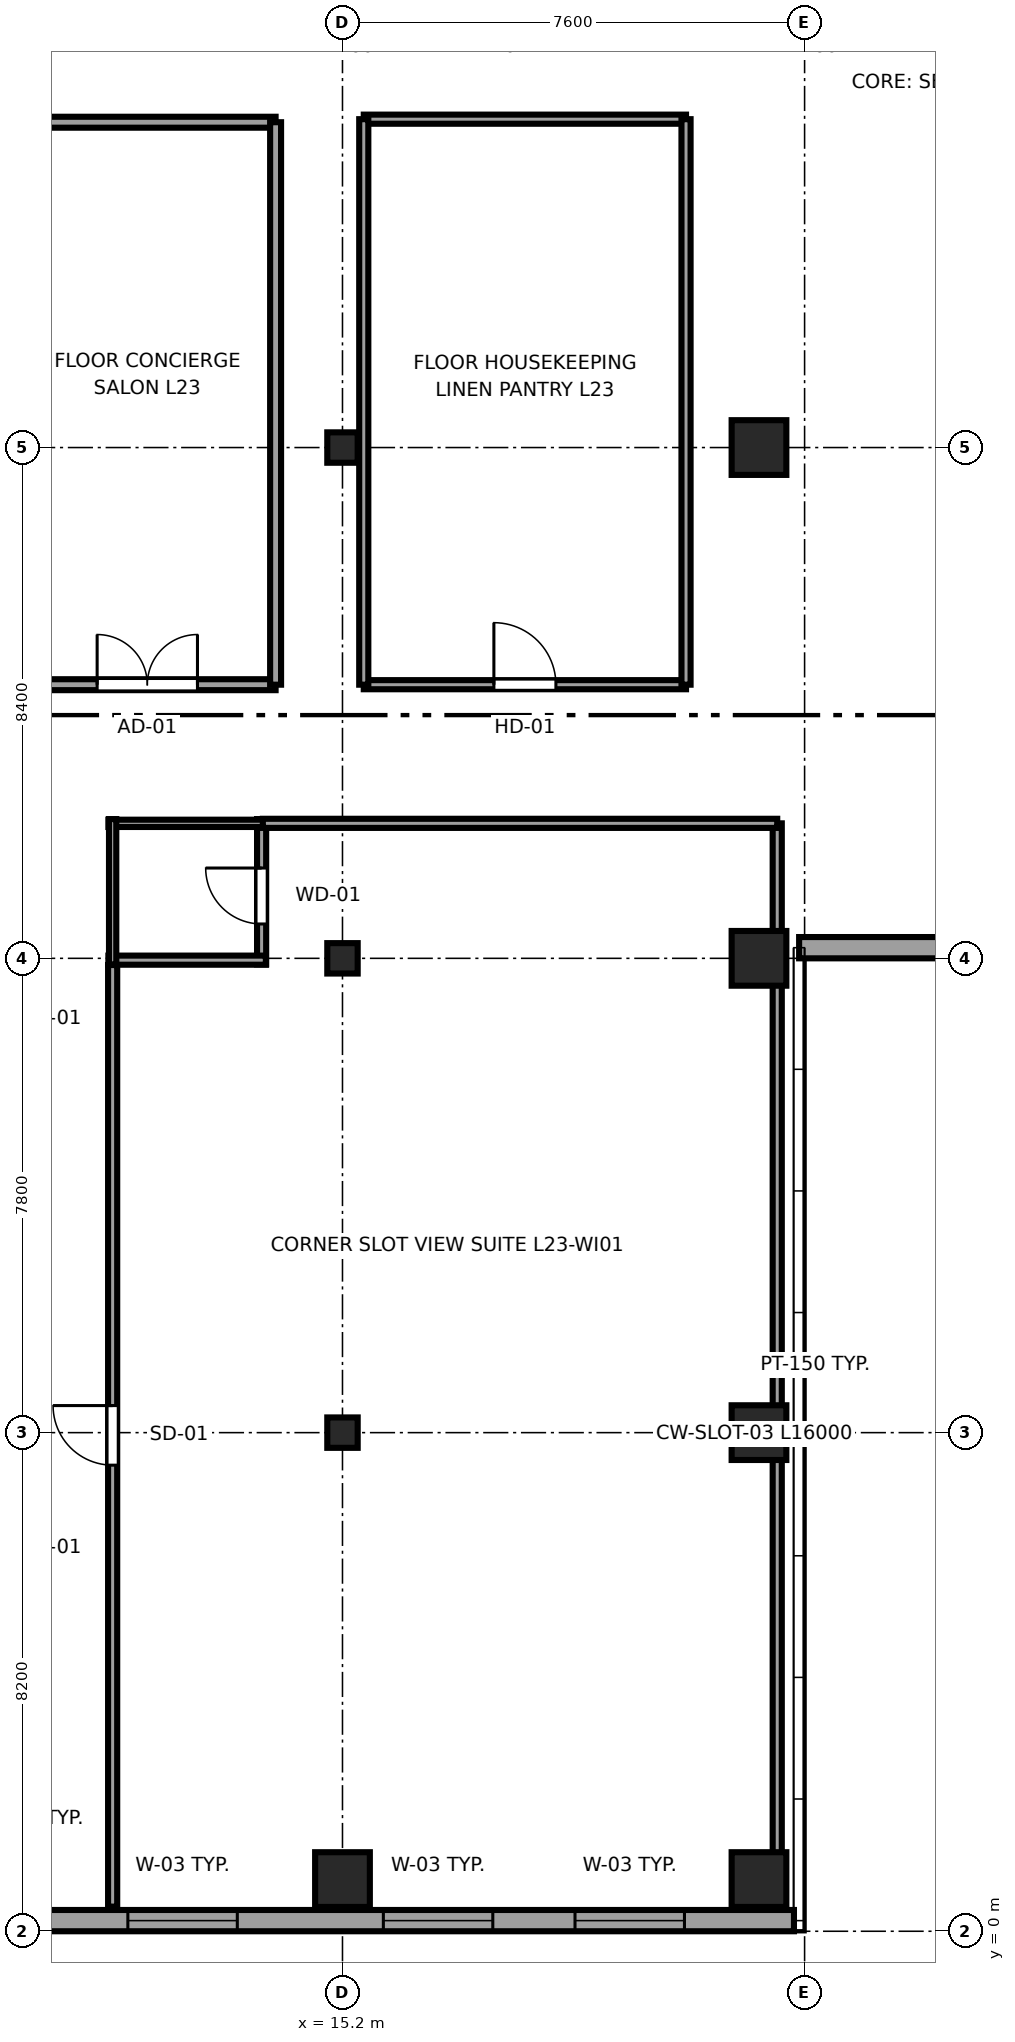
"""IFC4 building model, lengths in metres.
Left out: names, types, materials, properties, quantities, classifications, styles, units other than length and angle.
Written with IfcOpenShell. Run it as: python <this file> out.ifc"""

import sys

from ifc_helpers import new_model, si_unit, direction, frame, frame_2d, origin, origin_2d, place, context, subcontext, project, spatial, rectangle, i_section, extrude, source, transform, mapped, element, fill, save


model = new_model("IFC4")
c1 = context("Model", 3, precision=1e-05, world=origin(), true_north=direction((0.0, 1.0)))
c2 = subcontext(c1, "Body", "Model", "MODEL_VIEW")
j1 = project(units=[si_unit("LENGTHUNIT", "METRE"), si_unit("PLANEANGLEUNIT", "RADIAN")], contexts=[c1])
p1 = place(None, origin())
s1 = spatial("IfcSite", under=j1, at=p1, CompositionType="ELEMENT")
p2 = place(p1, origin())
s2 = spatial("IfcBuilding", under=s1, at=p2, CompositionType="ELEMENT")
p3 = place(p2, frame((0.0, 0.0, 92.35)))
s3 = spatial("IfcBuildingStorey", under=s2, at=p3, CompositionType="ELEMENT", Elevation=92.35)
m1 = source(origin(), c2, "Body", "SweptSolid", [
    extrude(rectangle(XDim=0.9, YDim=0.9, at=origin_2d()), origin(), (0.0, 0.0, 1.0), 3.55),
])
p4 = place(p3, frame((15.2, 0.85, 0.0), z_axis=(0.0, 0.0, 1.0), x_axis=(1.0, 0.0, 0.0)))
e1 = element("IfcColumn", 1, at=p4, inside=s3, PredefinedType="COLUMN", context=c2, shape_type="MappedRepresentation", body=[
    mapped(m1, transform((0.0, 0.0, 0.0), x_axis=(1.0, 0.0, 0.0), y_axis=(0.0, 1.0, 0.0), z_axis=(0.0, 0.0, 1.0), scale=1.0)),
])
m2 = source(origin(), c2, "Body", "SweptSolid", [
    extrude(i_section(OverallWidth=0.5, OverallDepth=0.5, WebThickness=0.022, FlangeThickness=0.034, at=origin_2d()), origin(), (0.0, 0.0, 1.0), 3.55),
])
for number, where, z_axis, x_axis in (
    (2, (15.2, 8.2, 0.0), (0.0, 0.0, 1.0), (1.0, 0.0, 0.0)),
    (3, (15.2, 16.0, 0.0), (0.0, 0.0, 1.0), (1.0, 0.0, 0.0)),
    (4, (15.2, 24.4, 0.0), (0.0, 0.0, 1.0), (1.0, 0.0, 0.0)),
):
    element("IfcColumn", number, at=place(p3, frame(where, z_axis=z_axis, x_axis=x_axis)), inside=s3, PredefinedType="COLUMN", context=c2, shape_type="MappedRepresentation", body=[
        mapped(m2, transform((0.0, 0.0, 0.0), x_axis=(1.0, 0.0, 0.0), y_axis=(0.0, 1.0, 0.0), z_axis=(0.0, 0.0, 1.0), scale=1.0)),
    ])
for number, where, z_axis, x_axis in (
    (5, (22.05, 0.85, 0.0), (0.0, 0.0, 1.0), (1.0, 0.0, 0.0)),
    (6, (22.05, 8.2, 0.0), (0.0, 0.0, 1.0), (1.0, 0.0, 0.0)),
    (7, (22.05, 16.0, 0.0), (0.0, 0.0, 1.0), (1.0, 0.0, 0.0)),
    (8, (22.05, 24.4, 0.0), (0.0, 0.0, 1.0), (1.0, 0.0, 0.0)),
):
    element("IfcColumn", number, at=place(p3, frame(where, z_axis=z_axis, x_axis=x_axis)), inside=s3, PredefinedType="COLUMN", context=c2, shape_type="MappedRepresentation", body=[
        mapped(m1, transform((0.0, 0.0, 0.0), x_axis=(1.0, 0.0, 0.0), y_axis=(0.0, 1.0, 0.0), z_axis=(0.0, 0.0, 1.0), scale=1.0)),
    ])
p5 = place(p3, frame((4.617, 0.175, 0.0), z_axis=(0.0, 0.0, 1.0), x_axis=(1.0, 0.0, 0.0)))
e9 = element("IfcWall", 9, at=p5, inside=s3, PredefinedType="SOLIDWALL", context=c2, shape_type="SweptSolid", body=[
    extrude(rectangle(XDim=18.008, YDim=0.35, at=frame_2d((9.004, 0.0))), origin(), (0.0, 0.0, 1.0), 3.25),
])
p6 = place(p5, frame((7.053, 0.0, 0.68)))
e10 = element("IfcOpeningElement", 10, at=p6, cuts=e9, PredefinedType="OPENING", context=c2, shape_type="SweptSolid", body=[
    extrude(rectangle(XDim=1.8, YDim=1.85, at=frame_2d((0.9, 0.925))), frame((0.0, 0.185, 0.0), z_axis=(0.0, -1.0, 0.0), x_axis=(1.0, 0.0, 0.0)), (0.0, 0.0, 1.0), 0.37),
])
p7 = place(p5, frame((11.255, 0.0, 0.68)))
e11 = element("IfcOpeningElement", 11, at=p7, cuts=e9, PredefinedType="OPENING", context=c2, shape_type="SweptSolid", body=[
    extrude(rectangle(XDim=1.8, YDim=1.85, at=frame_2d((0.9, 0.925))), frame((0.0, 0.185, 0.0), z_axis=(0.0, -1.0, 0.0), x_axis=(1.0, 0.0, 0.0)), (0.0, 0.0, 1.0), 0.37),
])
p8 = place(p5, frame((14.407, 0.0, 0.68)))
e12 = element("IfcOpeningElement", 12, at=p8, cuts=e9, PredefinedType="OPENING", context=c2, shape_type="SweptSolid", body=[
    extrude(rectangle(XDim=1.8, YDim=1.85, at=frame_2d((0.9, 0.925))), frame((0.0, 0.185, 0.0), z_axis=(0.0, -1.0, 0.0), x_axis=(1.0, 0.0, 0.0)), (0.0, 0.0, 1.0), 0.37),
])
p9 = place(p3, frame((22.71, 16.175, 0.0), z_axis=(0.0, 0.0, 1.0), x_axis=(1.0, 0.0, 0.0)))
e13 = element("IfcWall", 13, at=p9, inside=s3, PredefinedType="SOLIDWALL", context=c2, shape_type="SweptSolid", body=[
    extrude(rectangle(XDim=11.58, YDim=0.35, at=frame_2d((5.79, 0.0))), origin(), (0.0, 0.0, 1.0), 2.628),
])
p10 = place(p9, frame((2.295, 0.0, 0.68)))
e14 = element("IfcOpeningElement", 14, at=p10, cuts=e13, PredefinedType="OPENING", context=c2, shape_type="SweptSolid", body=[
    extrude(rectangle(XDim=1.8, YDim=1.85, at=frame_2d((0.9, 0.925))), frame((0.0, 0.185, 0.0), z_axis=(0.0, -1.0, 0.0), x_axis=(1.0, 0.0, 0.0)), (0.0, 0.0, 1.0), 0.37),
])
p11 = place(p9, frame((7.485, 0.0, 0.68)))
e15 = element("IfcOpeningElement", 15, at=p11, cuts=e13, PredefinedType="OPENING", context=c2, shape_type="SweptSolid", body=[
    extrude(rectangle(XDim=1.8, YDim=1.85, at=frame_2d((0.9, 0.925))), frame((0.0, 0.185, 0.0), z_axis=(0.0, -1.0, 0.0), x_axis=(1.0, 0.0, 0.0)), (0.0, 0.0, 1.0), 0.37),
])
p12 = place(p3, frame((13.87, 15.9, 0.0), z_axis=(0.0, 0.0, 1.0), x_axis=(0.0, 1.0, 0.0)))
e16 = element("IfcWall", 16, at=p12, inside=s3, PredefinedType="PARTITIONING", context=c2, shape_type="SweptSolid", body=[
    extrude(rectangle(XDim=2.39, YDim=0.15, at=frame_2d((1.195, 0.0))), origin(), (0.0, 0.0, 1.0), 3.25),
])
p13 = place(p12, frame((0.665, 0.0, 0.0)))
e17 = element("IfcOpeningElement", 17, at=p13, cuts=e16, PredefinedType="OPENING", context=c2, shape_type="SweptSolid", body=[
    extrude(rectangle(XDim=0.92, YDim=2.01, at=frame_2d((0.46, 1.005))), frame((0.0, 0.085, 0.0), z_axis=(0.0, -1.0, 0.0), x_axis=(1.0, 0.0, 0.0)), (0.0, 0.0, 1.0), 0.17),
])
p14 = place(p3, frame((11.35, 15.97, 0.0), z_axis=(0.0, 0.0, 1.0), x_axis=(1.0, 0.0, 0.0)))
e18 = element("IfcWall", 18, at=p14, inside=s3, PredefinedType="PARTITIONING", context=c2, shape_type="SweptSolid", body=[
    extrude(rectangle(XDim=2.59, YDim=0.15, at=frame_2d((1.295, 0.0))), origin(), (0.0, 0.0, 1.0), 2.628),
])
p15 = place(p3, frame((11.35, 18.22, 0.0), z_axis=(0.0, 0.0, 1.0), x_axis=(1.0, 0.0, 0.0)))
e19 = element("IfcWall", 19, at=p15, inside=s3, PredefinedType="PLUMBINGWALL", context=c2, shape_type="SweptSolid", body=[
    extrude(rectangle(XDim=2.59, YDim=0.12, at=frame_2d((1.295, 0.0))), origin(), (0.0, 0.0, 1.0), 3.25),
])
p16 = place(p3, frame((11.42, 15.9, 0.0), z_axis=(0.0, 0.0, 1.0), x_axis=(0.0, 1.0, 0.0)))
e20 = element("IfcWall", 20, at=p16, inside=s3, PredefinedType="PLUMBINGWALL", context=c2, shape_type="SweptSolid", body=[
    extrude(rectangle(XDim=2.39, YDim=0.12, at=frame_2d((1.195, 0.0))), origin(), (0.0, 0.0, 1.0), 2.834),
])
p17 = place(p3, frame((11.42, 0.405, 0.0), z_axis=(0.0, 0.0, 1.0), x_axis=(0.0, 1.0, 0.0)))
e21 = element("IfcWall", 21, at=p17, inside=s3, PredefinedType="PARTITIONING", context=c2, shape_type="SweptSolid", body=[
    extrude(rectangle(XDim=15.485, YDim=0.15, at=frame_2d((7.742, 0.0))), origin(), (0.0, 0.0, 1.0), 2.834),
])
p18 = place(p17, frame((7.26, 0.0, 0.0)))
e22 = element("IfcOpeningElement", 22, at=p18, cuts=e21, PredefinedType="OPENING", context=c2, shape_type="SweptSolid", body=[
    extrude(rectangle(XDim=0.98, YDim=2.12, at=frame_2d((0.49, 1.06))), frame((0.0, 0.085, 0.0), z_axis=(0.0, -1.0, 0.0), x_axis=(1.0, 0.0, 0.0)), (0.0, 0.0, 1.0), 0.17),
])
p19 = place(p3, frame((22.35, 0.405, 0.0), z_axis=(0.0, 0.0, 1.0), x_axis=(0.0, 1.0, 0.0)))
e23 = element("IfcWall", 23, at=p19, inside=s3, PredefinedType="PARTITIONING", context=c2, shape_type="SweptSolid", body=[
    extrude(rectangle(XDim=17.815, YDim=0.15, at=frame_2d((8.907, 0.0))), origin(), (0.0, 0.0, 1.0), 3.25),
])
p20 = place(p3, frame((13.89, 18.22, 0.0), z_axis=(0.0, 0.0, 1.0), x_axis=(1.0, 0.0, 0.0)))
e24 = element("IfcWall", 24, at=p20, inside=s3, PredefinedType="PARTITIONING", context=c2, shape_type="SweptSolid", body=[
    extrude(rectangle(XDim=8.46, YDim=0.15, at=frame_2d((4.23, 0.0))), origin(), (0.0, 0.0, 1.0), 3.25),
])
p21 = place(p3, frame((9.88, 20.5, 0.0), z_axis=(0.0, 0.0, 1.0), x_axis=(1.0, 0.0, 0.0)))
e25 = element("IfcWall", 25, at=p21, inside=s3, PredefinedType="PARTITIONING", context=c2, shape_type="SweptSolid", body=[
    extrude(rectangle(XDim=4.22, YDim=0.18, at=frame_2d((2.11, 0.0))), origin(), (0.0, 0.0, 1.0), 3.25),
])
p22 = place(p21, frame((1.285, 0.0, 0.0)))
e26 = element("IfcOpeningElement", 26, at=p22, cuts=e25, PredefinedType="OPENING", context=c2, shape_type="SweptSolid", body=[
    extrude(rectangle(XDim=1.65, YDim=2.15, at=frame_2d((0.825, 1.075))), frame((0.0, 0.1, 0.0), z_axis=(0.0, -1.0, 0.0), x_axis=(1.0, 0.0, 0.0)), (0.0, 0.0, 1.0), 0.2),
])
p23 = place(p3, frame((9.88, 29.75, 0.0), z_axis=(0.0, 0.0, 1.0), x_axis=(1.0, 0.0, 0.0)))
e27 = element("IfcWall", 27, at=p23, inside=s3, PredefinedType="PARTITIONING", context=c2, shape_type="SweptSolid", body=[
    extrude(rectangle(XDim=4.22, YDim=0.18, at=frame_2d((2.11, 0.0))), origin(), (0.0, 0.0, 1.0), 3.25),
])
p24 = place(p3, frame((14.1, 20.5, 0.0), z_axis=(0.0, 0.0, 1.0), x_axis=(0.0, 1.0, 0.0)))
e28 = element("IfcWall", 28, at=p24, inside=s3, PredefinedType="PARTITIONING", context=c2, shape_type="SweptSolid", body=[
    extrude(rectangle(XDim=9.25, YDim=0.18, at=frame_2d((4.625, 0.0))), origin(), (0.0, 0.0, 1.0), 3.25),
])
p25 = place(p3, frame((15.55, 20.5, 0.0), z_axis=(0.0, 0.0, 1.0), x_axis=(1.0, 0.0, 0.0)))
e29 = element("IfcWall", 29, at=p25, inside=s3, PredefinedType="PARTITIONING", context=c2, shape_type="SweptSolid", body=[
    extrude(rectangle(XDim=5.3, YDim=0.15, at=frame_2d((2.65, 0.0))), origin(), (0.0, 0.0, 1.0), 3.25),
])
p26 = place(p25, frame((2.14, 0.0, 0.0)))
e30 = element("IfcOpeningElement", 30, at=p26, cuts=e29, PredefinedType="OPENING", context=c2, shape_type="SweptSolid", body=[
    extrude(rectangle(XDim=1.02, YDim=2.03, at=frame_2d((0.51, 1.015))), frame((0.0, 0.085, 0.0), z_axis=(0.0, -1.0, 0.0), x_axis=(1.0, 0.0, 0.0)), (0.0, 0.0, 1.0), 0.17),
])
p27 = place(p3, frame((15.55, 29.8, 0.0), z_axis=(0.0, 0.0, 1.0), x_axis=(1.0, 0.0, 0.0)))
e31 = element("IfcWall", 31, at=p27, inside=s3, PredefinedType="PARTITIONING", context=c2, shape_type="SweptSolid", body=[
    extrude(rectangle(XDim=5.3, YDim=0.15, at=frame_2d((2.65, 0.0))), origin(), (0.0, 0.0, 1.0), 3.25),
])
for number, where, z_axis, x_axis in (
    (32, (15.55, 20.5, 0.0), (0.0, 0.0, 1.0), (0.0, 1.0, 0.0)),
    (33, (20.85, 20.5, 0.0), (0.0, 0.0, 1.0), (0.0, 1.0, 0.0)),
):
    element("IfcWall", number, at=place(p3, frame(where, z_axis=z_axis, x_axis=x_axis)), inside=s3, PredefinedType="PARTITIONING", context=c2, shape_type="SweptSolid", body=[
        extrude(rectangle(XDim=9.3, YDim=0.15, at=frame_2d((4.65, 0.0))), origin(), (0.0, 0.0, 1.0), 3.25),
    ])
m3 = source(origin(), c2, "Body", "SweptSolid", [
    extrude(rectangle(XDim=1.8, YDim=1.85, at=frame_2d((0.9, 0.925))), frame((0.0, 0.09, 0.0), z_axis=(0.0, -1.0, 0.0), x_axis=(1.0, 0.0, 0.0)), (0.0, 0.0, 1.0), 0.06),
])
p28 = place(p6, origin())
e34 = element("IfcWindow", 34, at=p28, inside=s3, PartitioningType="TRIPLE_PANEL_HORIZONTAL", PredefinedType="WINDOW", context=c2, shape_type="MappedRepresentation", body=[
    mapped(m3, transform((0.0, 0.0, 0.0), x_axis=(1.0, 0.0, 0.0), y_axis=(0.0, 1.0, 0.0), z_axis=(0.0, 0.0, 1.0), scale=1.0)),
])
fill(e10, e34)
p29 = place(p7, origin())
e35 = element("IfcWindow", 35, at=p29, inside=s3, PartitioningType="TRIPLE_PANEL_HORIZONTAL", PredefinedType="WINDOW", context=c2, shape_type="MappedRepresentation", body=[
    mapped(m3, transform((0.0, 0.0, 0.0), x_axis=(1.0, 0.0, 0.0), y_axis=(0.0, 1.0, 0.0), z_axis=(0.0, 0.0, 1.0), scale=1.0)),
])
fill(e11, e35)
p30 = place(p8, origin())
e36 = element("IfcWindow", 36, at=p30, inside=s3, PartitioningType="TRIPLE_PANEL_HORIZONTAL", PredefinedType="WINDOW", context=c2, shape_type="MappedRepresentation", body=[
    mapped(m3, transform((0.0, 0.0, 0.0), x_axis=(1.0, 0.0, 0.0), y_axis=(0.0, 1.0, 0.0), z_axis=(0.0, 0.0, 1.0), scale=1.0)),
])
fill(e12, e36)
m4 = source(origin(), c2, "Body", "SweptSolid", [
    extrude(rectangle(XDim=0.92, YDim=2.01, at=frame_2d((0.46, 1.005))), frame((0.0, 0.025, 0.0), z_axis=(0.0, -1.0, 0.0), x_axis=(1.0, 0.0, 0.0)), (0.0, 0.0, 1.0), 0.05),
])
p31 = place(p13, origin())
e37 = element("IfcDoor", 37, at=p31, inside=s3, OperationType="SINGLE_SWING_RIGHT", PredefinedType="DOOR", context=c2, shape_type="MappedRepresentation", body=[
    mapped(m4, transform((0.0, 0.0, 0.0), x_axis=(1.0, 0.0, 0.0), y_axis=(0.0, 1.0, 0.0), z_axis=(0.0, 0.0, 1.0), scale=1.0)),
])
fill(e17, e37)
m5 = source(origin(), c2, "Body", "SweptSolid", [
    extrude(rectangle(XDim=0.98, YDim=2.12, at=frame_2d((0.49, 1.06))), frame((0.0, 0.025, 0.0), z_axis=(0.0, -1.0, 0.0), x_axis=(1.0, 0.0, 0.0)), (0.0, 0.0, 1.0), 0.05),
])
p32 = place(p18, origin())
e38 = element("IfcDoor", 38, at=p32, inside=s3, OperationType="SINGLE_SWING_RIGHT", PredefinedType="DOOR", context=c2, shape_type="MappedRepresentation", body=[
    mapped(m5, transform((0.0, 0.0, 0.0), x_axis=(1.0, 0.0, 0.0), y_axis=(0.0, 1.0, 0.0), z_axis=(0.0, 0.0, 1.0), scale=1.0)),
])
fill(e22, e38)
m6 = source(origin(), c2, "Body", "SweptSolid", [
    extrude(rectangle(XDim=1.65, YDim=2.15, at=frame_2d((0.825, 1.075))), frame((0.0, 0.025, 0.0), z_axis=(0.0, -1.0, 0.0), x_axis=(1.0, 0.0, 0.0)), (0.0, 0.0, 1.0), 0.05),
])
p33 = place(p22, origin())
e39 = element("IfcDoor", 39, at=p33, inside=s3, OperationType="DOUBLE_DOOR_SINGLE_SWING", PredefinedType="DOOR", context=c2, shape_type="MappedRepresentation", body=[
    mapped(m6, transform((0.0, 0.0, 0.0), x_axis=(1.0, 0.0, 0.0), y_axis=(0.0, 1.0, 0.0), z_axis=(0.0, 0.0, 1.0), scale=1.0)),
])
fill(e26, e39)
m7 = source(origin(), c2, "Body", "SweptSolid", [
    extrude(rectangle(XDim=1.02, YDim=2.03, at=frame_2d((0.51, 1.015))), frame((0.0, 0.025, 0.0), z_axis=(0.0, -1.0, 0.0), x_axis=(1.0, 0.0, 0.0)), (0.0, 0.0, 1.0), 0.05),
])
p34 = place(p26, origin())
e40 = element("IfcDoor", 40, at=p34, inside=s3, OperationType="SINGLE_SWING_LEFT", PredefinedType="DOOR", context=c2, shape_type="MappedRepresentation", body=[
    mapped(m7, transform((0.0, 0.0, 0.0), x_axis=(1.0, 0.0, 0.0), y_axis=(0.0, 1.0, 0.0), z_axis=(0.0, 0.0, 1.0), scale=1.0)),
])
fill(e30, e40)
save(model, sys.argv[1])
